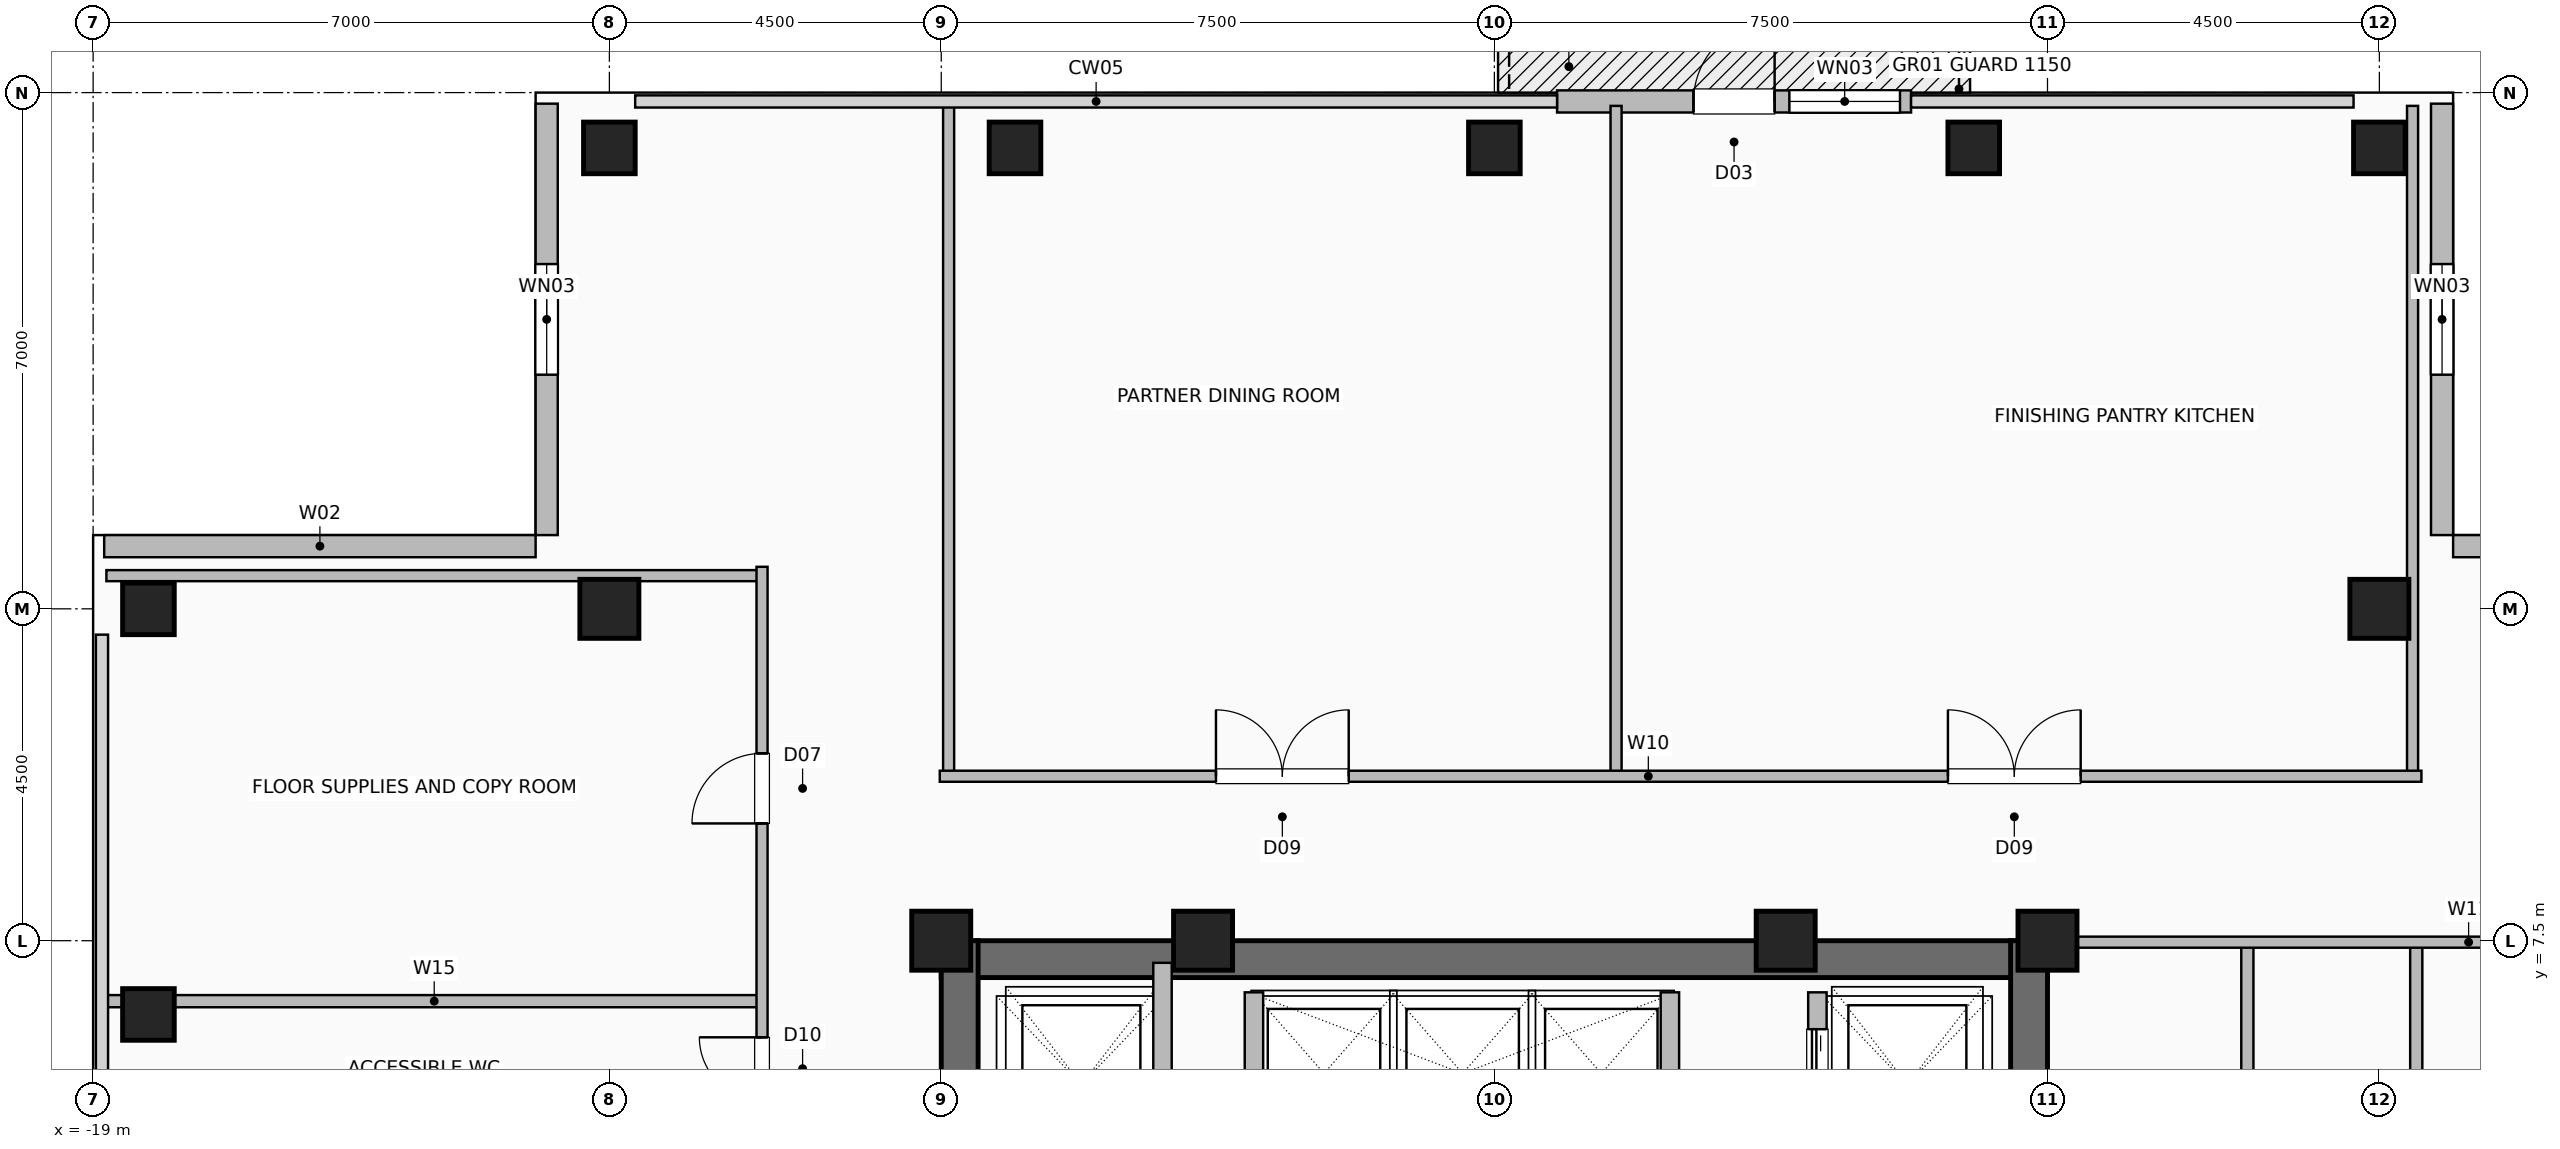
"""IFC4 building model, lengths in metres.
Left out: names, types, materials, properties, quantities, classifications, styles, units other than length and angle.
Written with IfcOpenShell. Run it as: python <this file> out.ifc"""

import sys

from ifc_helpers import new_model, si_unit, direction, frame, frame_2d, origin, origin_2d, place, context, subcontext, project, spatial, rectangle, hollow_rectangle, extrude, element, fill, save


model = new_model("IFC4")
c1 = context("Model", 3, precision=1e-05, world=origin(), true_north=direction((0.0, 1.0)))
c2 = subcontext(c1, "Body", "Model", "MODEL_VIEW")
j1 = project(units=[si_unit("LENGTHUNIT", "METRE"), si_unit("PLANEANGLEUNIT", "RADIAN")], contexts=[c1])
p1 = place(None, origin())
s1 = spatial("IfcSite", under=j1, at=p1, CompositionType="ELEMENT")
p2 = place(p1, origin())
s2 = spatial("IfcBuilding", under=s1, at=p2, CompositionType="ELEMENT")
p3 = place(p2, frame((0.0, 0.0, 275.6)))
s3 = spatial("IfcBuildingStorey", under=s2, at=p3, CompositionType="ELEMENT", Elevation=275.6)
for number, where, z_axis, x_axis in (
    (1, (7.5, 7.5, 0.0), (0.0, 0.0, 1.0), (1.0, 0.0, 0.0)),
    (2, (3.95, 7.5, 0.0), (0.0, 0.0, 1.0), (1.0, 0.0, 0.0)),
    (3, (-3.95, 7.5, 0.0), (0.0, 0.0, 1.0), (1.0, 0.0, 0.0)),
    (4, (-7.5, 7.5, 0.0), (0.0, 0.0, 1.0), (1.0, 0.0, 0.0)),
):
    element("IfcColumn", number, at=place(p3, frame(where, z_axis=z_axis, x_axis=x_axis)), inside=s3, PredefinedType="COLUMN", context=c2, shape_type="SweptSolid", body=[
        extrude(hollow_rectangle(XDim=0.8, YDim=0.8, WallThickness=0.04, at=origin_2d()), origin(), (0.0, 0.0, 1.0), 3.6),
    ])
for number, where, z_axis, x_axis in (
    (5, (-12.0, 18.25, 0.0), (0.0, 0.0, 1.0), (1.0, 0.0, 0.0)),
    (6, (-6.5, 18.25, 0.0), (0.0, 0.0, 1.0), (1.0, 0.0, 0.0)),
    (7, (0.0, 18.25, 0.0), (0.0, 0.0, 1.0), (1.0, 0.0, 0.0)),
    (8, (6.5, 18.25, 0.0), (0.0, 0.0, 1.0), (1.0, 0.0, 0.0)),
    (9, (-18.25, 6.5, 0.0), (0.0, 0.0, 1.0), (1.0, 0.0, 0.0)),
    (10, (12.0, 18.25, 0.0), (0.0, 0.0, 1.0), (1.0, 0.0, 0.0)),
    (11, (-18.25, 12.0, 0.0), (0.0, 0.0, 1.0), (1.0, 0.0, 0.0)),
):
    element("IfcColumn", number, at=place(p3, frame(where, z_axis=z_axis, x_axis=x_axis)), inside=s3, PredefinedType="COLUMN", context=c2, shape_type="SweptSolid", body=[
        extrude(hollow_rectangle(XDim=0.7, YDim=0.7, WallThickness=0.035, at=origin_2d()), origin(), (0.0, 0.0, 1.0), 3.6),
    ])
for number, where, z_axis, x_axis in (
    (12, (12.0, 12.0, 0.0), (0.0, 0.0, 1.0), (1.0, 0.0, 0.0)),
    (13, (-12.0, 12.0, 0.0), (0.0, 0.0, 1.0), (1.0, 0.0, 0.0)),
):
    element("IfcColumn", number, at=place(p3, frame(where, z_axis=z_axis, x_axis=x_axis)), inside=s3, PredefinedType="COLUMN", context=c2, shape_type="SweptSolid", body=[
        extrude(hollow_rectangle(XDim=0.8, YDim=0.8, WallThickness=0.04, at=origin_2d()), origin(), (0.0, 0.0, 1.0), 3.6),
    ])
p4 = place(p3, frame((0.85, 18.88, 0.0), z_axis=(0.0, 0.0, 1.0), x_axis=(1.0, 0.0, 0.0)))
e14 = element("IfcWall", 14, at=p4, inside=s3, PredefinedType="SOLIDWALL", context=c2, shape_type="SweptSolid", body=[
    extrude(rectangle(XDim=4.8, YDim=0.3, at=frame_2d((2.4, 0.0))), origin(), (0.0, 0.0, 1.0), 3.36),
])
p5 = place(p4, frame((1.85, 0.0, 0.0)))
e15 = element("IfcOpeningElement", 15, at=p5, cuts=e14, PredefinedType="OPENING", context=c2, shape_type="SweptSolid", body=[
    extrude(rectangle(XDim=1.1, YDim=2.2, at=frame_2d((0.55, 1.1))), frame((0.0, 0.16, 0.0), z_axis=(0.0, -1.0, 0.0), x_axis=(1.0, 0.0, 0.0)), (0.0, 0.0, 1.0), 0.32),
])
p6 = place(p4, frame((3.15, 0.0, 0.85)))
e16 = element("IfcOpeningElement", 16, at=p6, cuts=e14, PredefinedType="OPENING", context=c2, shape_type="SweptSolid", body=[
    extrude(rectangle(XDim=1.5, YDim=1.8, at=frame_2d((0.75, 0.9))), frame((0.0, 0.16, 0.0), z_axis=(0.0, -1.0, 0.0), x_axis=(1.0, 0.0, 0.0)), (0.0, 0.0, 1.0), 0.32),
])
p7 = place(p3, frame((12.85, 18.85, 0.0), z_axis=(0.0, 0.0, 1.0), x_axis=(0.0, -1.0, 0.0)))
e17 = element("IfcWall", 17, at=p7, inside=s3, PredefinedType="SOLIDWALL", context=c2, shape_type="SweptSolid", body=[
    extrude(rectangle(XDim=5.85, YDim=0.3, at=frame_2d((2.925, 0.0))), origin(), (0.0, 0.0, 1.0), 3.36),
])
p8 = place(p7, frame((2.175, 0.0, 0.9)))
e18 = element("IfcOpeningElement", 18, at=p8, cuts=e17, PredefinedType="OPENING", context=c2, shape_type="SweptSolid", body=[
    extrude(rectangle(XDim=1.5, YDim=1.8, at=frame_2d((0.75, 0.9))), frame((0.0, 0.16, 0.0), z_axis=(0.0, -1.0, 0.0), x_axis=(1.0, 0.0, 0.0)), (0.0, 0.0, 1.0), 0.32),
])
p9 = place(p3, frame((18.85, 12.85, 0.0), z_axis=(0.0, 0.0, 1.0), x_axis=(-1.0, 0.0, 0.0)))
e19 = element("IfcWall", 19, at=p9, inside=s3, PredefinedType="SOLIDWALL", context=c2, shape_type="SweptSolid", body=[
    extrude(rectangle(XDim=5.85, YDim=0.3, at=frame_2d((2.925, 0.0))), origin(), (0.0, 0.0, 1.0), 3.36),
])
p10 = place(p3, frame((-12.85, 18.85, 0.0), z_axis=(0.0, 0.0, 1.0), x_axis=(0.0, -1.0, 0.0)))
e20 = element("IfcWall", 20, at=p10, inside=s3, PredefinedType="SOLIDWALL", context=c2, shape_type="SweptSolid", body=[
    extrude(rectangle(XDim=5.85, YDim=0.3, at=frame_2d((2.925, 0.0))), origin(), (0.0, 0.0, 1.0), 3.36),
])
p11 = place(p10, frame((2.175, 0.0, 0.9)))
e21 = element("IfcOpeningElement", 21, at=p11, cuts=e20, PredefinedType="OPENING", context=c2, shape_type="SweptSolid", body=[
    extrude(rectangle(XDim=1.5, YDim=1.8, at=frame_2d((0.75, 0.9))), frame((0.0, 0.16, 0.0), z_axis=(0.0, -1.0, 0.0), x_axis=(1.0, 0.0, 0.0)), (0.0, 0.0, 1.0), 0.32),
])
p12 = place(p3, frame((-18.85, 12.85, 0.0), z_axis=(0.0, 0.0, 1.0), x_axis=(1.0, 0.0, 0.0)))
e22 = element("IfcWall", 22, at=p12, inside=s3, PredefinedType="SOLIDWALL", context=c2, shape_type="SweptSolid", body=[
    extrude(rectangle(XDim=5.85, YDim=0.3, at=frame_2d((2.925, 0.0))), origin(), (0.0, 0.0, 1.0), 3.36),
])
p13 = place(p3, frame((-7.5, 7.25, 0.0), z_axis=(0.0, 0.0, 1.0), x_axis=(1.0, 0.0, 0.0)))
e23 = element("IfcWall", 23, at=p13, inside=s3, PredefinedType="SHEAR", context=c2, shape_type="SweptSolid", body=[
    extrude(rectangle(XDim=15.0, YDim=0.5, at=frame_2d((7.5, 0.0))), origin(), (0.0, 0.0, 1.0), 3.36),
])
p14 = place(p3, frame((-7.25, -7.5, 0.0), z_axis=(0.0, 0.0, 1.0), x_axis=(0.0, 1.0, 0.0)))
e24 = element("IfcWall", 24, at=p14, inside=s3, PredefinedType="SHEAR", context=c2, shape_type="SweptSolid", body=[
    extrude(rectangle(XDim=15.0, YDim=0.5, at=frame_2d((7.5, 0.0))), origin(), (0.0, 0.0, 1.0), 3.36),
])
p15 = place(p14, frame((9.5, 0.0, 0.0)))
e25 = element("IfcOpeningElement", 25, at=p15, cuts=e24, PredefinedType="OPENING", context=c2, shape_type="SweptSolid", body=[
    extrude(rectangle(XDim=1.0, YDim=2.08, at=frame_2d((0.5, 1.04))), frame((0.0, 0.26, 0.0), z_axis=(0.0, -1.0, 0.0), x_axis=(1.0, 0.0, 0.0)), (0.0, 0.0, 1.0), 0.52),
])
p16 = place(p3, frame((7.25, -7.5, 0.0), z_axis=(0.0, 0.0, 1.0), x_axis=(0.0, 1.0, 0.0)))
e26 = element("IfcWall", 26, at=p16, inside=s3, PredefinedType="SHEAR", context=c2, shape_type="SweptSolid", body=[
    extrude(rectangle(XDim=15.0, YDim=0.5, at=frame_2d((7.5, 0.0))), origin(), (0.0, 0.0, 1.0), 3.36),
])
for number, where, z_axis, x_axis in (
    (27, (-3.26, 4.58, 0.0), (0.0, 0.0, 1.0), (0.0, 1.0, 0.0)),
    (28, (2.38, 4.58, 0.0), (0.0, 0.0, 1.0), (0.0, 1.0, 0.0)),
):
    element("IfcWall", number, at=place(p3, frame(where, z_axis=z_axis, x_axis=x_axis)), inside=s3, PredefinedType="SHEAR", context=c2, shape_type="SweptSolid", body=[
        extrude(rectangle(XDim=2.22, YDim=0.25, at=frame_2d((1.11, 0.0))), origin(), (0.0, 0.0, 1.0), 3.36),
    ])
p17 = place(p3, frame((-4.5, 4.35, 0.0), z_axis=(0.0, 0.0, 1.0), x_axis=(0.0, 1.0, 0.0)))
e29 = element("IfcWall", 29, at=p17, inside=s3, PredefinedType="SHEAR", context=c2, shape_type="SweptSolid", body=[
    extrude(rectangle(XDim=2.85, YDim=0.25, at=frame_2d((1.425, 0.0))), origin(), (0.0, 0.0, 1.0), 3.36),
])
p18 = place(p3, frame((4.38, 4.3, 0.0), z_axis=(0.0, 0.0, 1.0), x_axis=(0.0, 1.0, 0.0)))
e30 = element("IfcWall", 30, at=p18, inside=s3, PredefinedType="SHEAR", context=c2, shape_type="SweptSolid", body=[
    extrude(rectangle(XDim=2.5, YDim=0.25, at=frame_2d((1.25, 0.0))), origin(), (0.0, 0.0, 1.0), 3.36),
])
p19 = place(p18, frame((0.8, 0.0, 0.0)))
e31 = element("IfcOpeningElement", 31, at=p19, cuts=e30, PredefinedType="OPENING", context=c2, shape_type="SweptSolid", body=[
    extrude(rectangle(XDim=1.2, YDim=2.2, at=frame_2d((0.6, 1.1))), frame((0.0, 0.135, 0.0), z_axis=(0.0, -1.0, 0.0), x_axis=(1.0, 0.0, 0.0)), (0.0, 0.0, 1.0), 0.27),
])
p20 = place(p3, frame((-18.82, 6.68, 0.0), z_axis=(0.0, 0.0, 1.0), x_axis=(1.0, 0.0, 0.0)))
e32 = element("IfcWall", 32, at=p20, inside=s3, PredefinedType="PLUMBINGWALL", context=c2, shape_type="SweptSolid", body=[
    extrude(rectangle(XDim=8.89, YDim=0.165, at=frame_2d((4.445, 0.0))), origin(), (0.0, 0.0, 1.0), 3.36),
])
p21 = place(p3, frame((-18.82, 12.45, 0.0), z_axis=(0.0, 0.0, 1.0), x_axis=(1.0, 0.0, 0.0)))
e33 = element("IfcWall", 33, at=p21, inside=s3, PredefinedType="PARTITIONING", context=c2, shape_type="SweptSolid", body=[
    extrude(rectangle(XDim=8.89, YDim=0.15, at=frame_2d((4.445, 0.0))), origin(), (0.0, 0.0, 1.0), 3.36),
])
p22 = place(p3, frame((-9.93, -7.52, 0.0), z_axis=(0.0, 0.0, 1.0), x_axis=(0.0, 1.0, 0.0)))
e34 = element("IfcWall", 34, at=p22, inside=s3, PredefinedType="PARTITIONING", context=c2, shape_type="SweptSolid", body=[
    extrude(rectangle(XDim=20.09, YDim=0.15, at=frame_2d((10.045, 0.0))), origin(), (0.0, 0.0, 1.0), 3.36),
])
p23 = place(p22, frame((2.445, 0.0, 0.0)))
e35 = element("IfcOpeningElement", 35, at=p23, cuts=e34, PredefinedType="OPENING", context=c2, shape_type="SweptSolid", body=[
    extrude(rectangle(XDim=0.95, YDim=2.06, at=frame_2d((0.475, 1.03))), frame((0.0, 0.085, 0.0), z_axis=(0.0, -1.0, 0.0), x_axis=(1.0, 0.0, 0.0)), (0.0, 0.0, 1.0), 0.17),
])
p24 = place(p22, frame((8.57, 0.0, 0.0)))
e36 = element("IfcOpeningElement", 36, at=p24, cuts=e34, PredefinedType="OPENING", context=c2, shape_type="SweptSolid", body=[
    extrude(rectangle(XDim=0.95, YDim=2.06, at=frame_2d((0.475, 1.03))), frame((0.0, 0.085, 0.0), z_axis=(0.0, -1.0, 0.0), x_axis=(1.0, 0.0, 0.0)), (0.0, 0.0, 1.0), 0.17),
])
p25 = place(p22, frame((12.86, 0.0, 0.0)))
e37 = element("IfcOpeningElement", 37, at=p25, cuts=e34, PredefinedType="OPENING", context=c2, shape_type="SweptSolid", body=[
    extrude(rectangle(XDim=0.85, YDim=2.05, at=frame_2d((0.425, 1.025))), frame((0.0, 0.085, 0.0), z_axis=(0.0, -1.0, 0.0), x_axis=(1.0, 0.0, 0.0)), (0.0, 0.0, 1.0), 0.17),
])
p26 = place(p22, frame((16.61, 0.0, 0.0)))
e38 = element("IfcOpeningElement", 38, at=p26, cuts=e34, PredefinedType="OPENING", context=c2, shape_type="SweptSolid", body=[
    extrude(rectangle(XDim=0.95, YDim=2.06, at=frame_2d((0.475, 1.03))), frame((0.0, 0.085, 0.0), z_axis=(0.0, -1.0, 0.0), x_axis=(1.0, 0.0, 0.0)), (0.0, 0.0, 1.0), 0.17),
])
for number, where, z_axis, x_axis in (
    (39, (-7.4, 9.73, 0.0), (0.0, 0.0, 1.0), (0.0, 1.0, 0.0)),
    (40, (1.65, 9.73, 0.0), (0.0, 0.0, 1.0), (0.0, 1.0, 0.0)),
    (41, (12.45, 9.73, 0.0), (0.0, 0.0, 1.0), (0.0, 1.0, 0.0)),
):
    element("IfcWall", number, at=place(p3, frame(where, z_axis=z_axis, x_axis=x_axis)), inside=s3, PredefinedType="PARTITIONING", context=c2, shape_type="SweptSolid", body=[
        extrude(rectangle(XDim=9.09, YDim=0.15, at=frame_2d((4.545, 0.0))), origin(), (0.0, 0.0, 1.0), 3.36),
    ])
p27 = place(p3, frame((-7.52, 9.73, 0.0), z_axis=(0.0, 0.0, 1.0), x_axis=(1.0, 0.0, 0.0)))
e42 = element("IfcWall", 42, at=p27, inside=s3, PredefinedType="PARTITIONING", context=c2, shape_type="SweptSolid", body=[
    extrude(rectangle(XDim=20.09, YDim=0.15, at=frame_2d((10.045, 0.0))), origin(), (0.0, 0.0, 1.0), 3.36),
])
p28 = place(p27, frame((3.745, 0.0, 0.0)))
e43 = element("IfcOpeningElement", 43, at=p28, cuts=e42, PredefinedType="OPENING", context=c2, shape_type="SweptSolid", body=[
    extrude(rectangle(XDim=1.8, YDim=2.08, at=frame_2d((0.9, 1.04))), frame((0.0, 0.085, 0.0), z_axis=(0.0, -1.0, 0.0), x_axis=(1.0, 0.0, 0.0)), (0.0, 0.0, 1.0), 0.17),
])
p29 = place(p27, frame((13.67, 0.0, 0.0)))
e44 = element("IfcOpeningElement", 44, at=p29, cuts=e42, PredefinedType="OPENING", context=c2, shape_type="SweptSolid", body=[
    extrude(rectangle(XDim=1.8, YDim=2.08, at=frame_2d((0.9, 1.04))), frame((0.0, 0.085, 0.0), z_axis=(0.0, -1.0, 0.0), x_axis=(1.0, 0.0, 0.0)), (0.0, 0.0, 1.0), 0.17),
])
for number, where, z_axis, x_axis in (
    (45, (10.21, -7.48, 0.0), (0.0, 0.0, 1.0), (0.0, 1.0, 0.0)),
    (46, (12.5, -7.48, 0.0), (0.0, 0.0, 1.0), (0.0, 1.0, 0.0)),
):
    element("IfcWall", number, at=place(p3, frame(where, z_axis=z_axis, x_axis=x_axis)), inside=s3, PredefinedType="PLUMBINGWALL", context=c2, shape_type="SweptSolid", body=[
        extrude(rectangle(XDim=14.9, YDim=0.165, at=frame_2d((7.45, 0.0))), origin(), (0.0, 0.0, 1.0), 3.36),
    ])
p30 = place(p3, frame((7.6, 7.48, 0.0), z_axis=(0.0, 0.0, 1.0), x_axis=(1.0, 0.0, 0.0)))
e47 = element("IfcWall", 47, at=p30, inside=s3, PredefinedType="PARTITIONING", context=c2, shape_type="SweptSolid", body=[
    extrude(rectangle(XDim=11.22, YDim=0.15, at=frame_2d((5.61, 0.0))), origin(), (0.0, 0.0, 1.0), 3.36),
])
p31 = place(p5, origin())
e48 = element("IfcDoor", 48, at=p31, inside=s3, OperationType="SINGLE_SWING_RIGHT", PredefinedType="DOOR", context=c2, shape_type="SweptSolid", body=[
    extrude(rectangle(XDim=1.1, YDim=2.2, at=frame_2d((0.55, 1.1))), frame((0.0, 0.025, 0.0), z_axis=(0.0, -1.0, 0.0), x_axis=(1.0, 0.0, 0.0)), (0.0, 0.0, 1.0), 0.05),
])
fill(e15, e48)
p32 = place(p6, origin())
e49 = element("IfcWindow", 49, at=p32, inside=s3, PartitioningType="SINGLE_PANEL", PredefinedType="WINDOW", context=c2, shape_type="SweptSolid", body=[
    extrude(rectangle(XDim=1.5, YDim=1.8, at=frame_2d((0.75, 0.9))), frame((0.0, 0.03, 0.0), z_axis=(0.0, -1.0, 0.0), x_axis=(1.0, 0.0, 0.0)), (0.0, 0.0, 1.0), 0.06),
])
fill(e16, e49)
p33 = place(p8, origin())
e50 = element("IfcWindow", 50, at=p33, inside=s3, PartitioningType="SINGLE_PANEL", PredefinedType="WINDOW", context=c2, shape_type="SweptSolid", body=[
    extrude(rectangle(XDim=1.5, YDim=1.8, at=frame_2d((0.75, 0.9))), frame((0.0, 0.03, 0.0), z_axis=(0.0, -1.0, 0.0), x_axis=(1.0, 0.0, 0.0)), (0.0, 0.0, 1.0), 0.06),
])
fill(e18, e50)
p34 = place(p11, origin())
e51 = element("IfcWindow", 51, at=p34, inside=s3, PartitioningType="SINGLE_PANEL", PredefinedType="WINDOW", context=c2, shape_type="SweptSolid", body=[
    extrude(rectangle(XDim=1.5, YDim=1.8, at=frame_2d((0.75, 0.9))), frame((0.0, 0.03, 0.0), z_axis=(0.0, -1.0, 0.0), x_axis=(1.0, 0.0, 0.0)), (0.0, 0.0, 1.0), 0.06),
])
fill(e21, e51)
p35 = place(p19, origin())
e52 = element("IfcDoor", 52, at=p35, inside=s3, OperationType="DOUBLE_DOOR_SLIDING", PredefinedType="DOOR", context=c2, shape_type="SweptSolid", body=[
    extrude(rectangle(XDim=1.2, YDim=2.2, at=frame_2d((0.6, 1.1))), frame((0.0, 0.025, 0.0), z_axis=(0.0, -1.0, 0.0), x_axis=(1.0, 0.0, 0.0)), (0.0, 0.0, 1.0), 0.05),
])
fill(e31, e52)
p36 = place(p25, origin())
e53 = element("IfcDoor", 53, at=p36, inside=s3, OperationType="SINGLE_SWING_RIGHT", PredefinedType="DOOR", context=c2, shape_type="SweptSolid", body=[
    extrude(rectangle(XDim=0.85, YDim=2.05, at=frame_2d((0.425, 1.025))), frame((0.0, 0.025, 0.0), z_axis=(0.0, -1.0, 0.0), x_axis=(1.0, 0.0, 0.0)), (0.0, 0.0, 1.0), 0.05),
])
fill(e37, e53)
p37 = place(p26, origin())
e54 = element("IfcDoor", 54, at=p37, inside=s3, OperationType="SINGLE_SWING_LEFT", PredefinedType="DOOR", context=c2, shape_type="SweptSolid", body=[
    extrude(rectangle(XDim=0.95, YDim=2.06, at=frame_2d((0.475, 1.03))), frame((0.0, 0.025, 0.0), z_axis=(0.0, -1.0, 0.0), x_axis=(1.0, 0.0, 0.0)), (0.0, 0.0, 1.0), 0.05),
])
fill(e38, e54)
p38 = place(p28, origin())
e55 = element("IfcDoor", 55, at=p38, inside=s3, OperationType="DOUBLE_DOOR_SINGLE_SWING", PredefinedType="DOOR", context=c2, shape_type="SweptSolid", body=[
    extrude(rectangle(XDim=1.8, YDim=2.08, at=frame_2d((0.9, 1.04))), frame((0.0, 0.025, 0.0), z_axis=(0.0, -1.0, 0.0), x_axis=(1.0, 0.0, 0.0)), (0.0, 0.0, 1.0), 0.05),
])
fill(e43, e55)
p39 = place(p29, origin())
e56 = element("IfcDoor", 56, at=p39, inside=s3, OperationType="DOUBLE_DOOR_SINGLE_SWING", PredefinedType="DOOR", context=c2, shape_type="SweptSolid", body=[
    extrude(rectangle(XDim=1.8, YDim=2.08, at=frame_2d((0.9, 1.04))), frame((0.0, 0.025, 0.0), z_axis=(0.0, -1.0, 0.0), x_axis=(1.0, 0.0, 0.0)), (0.0, 0.0, 1.0), 0.05),
])
fill(e44, e56)
save(model, sys.argv[1])
